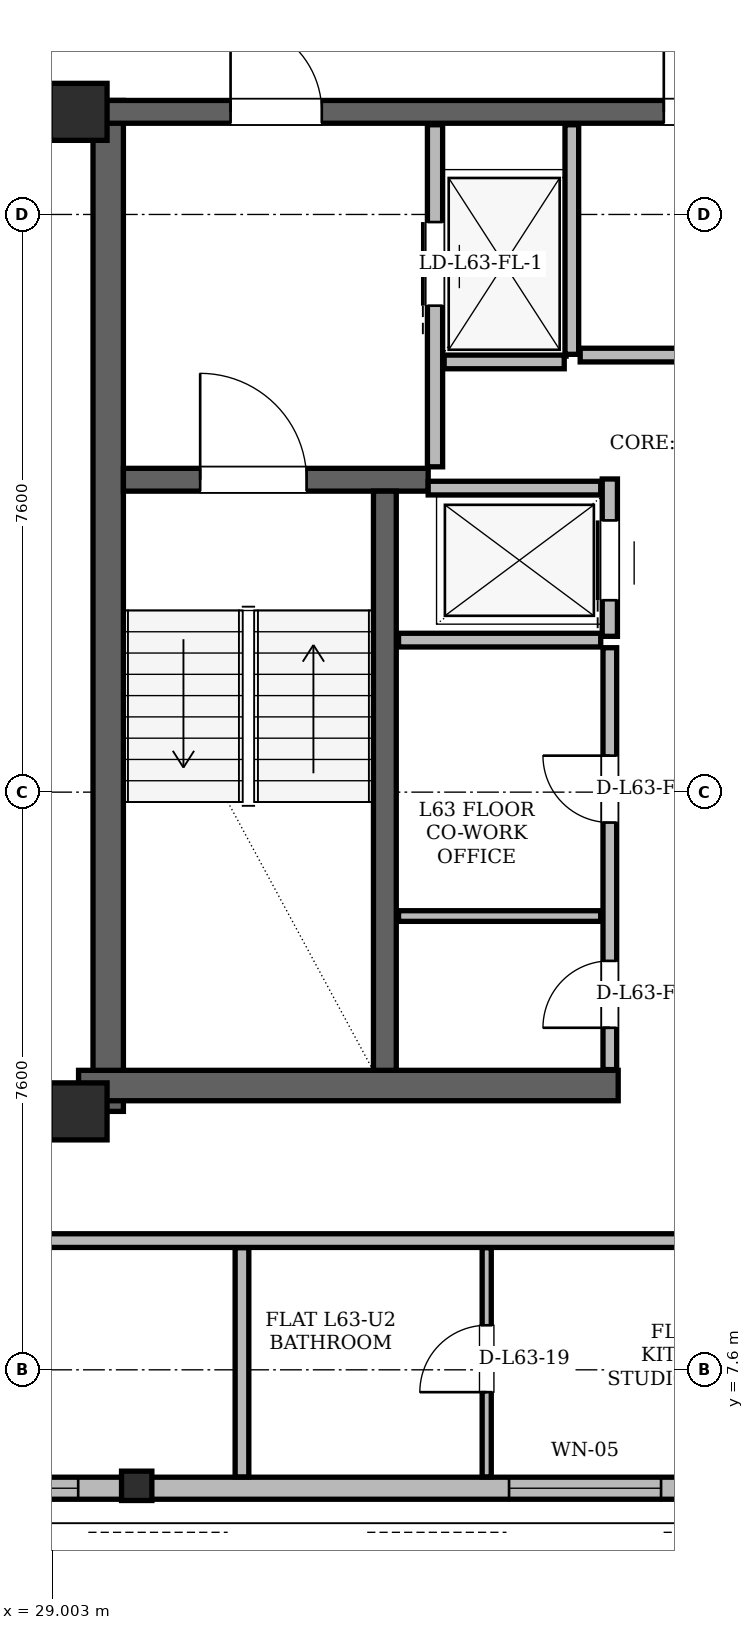
"""IFC4 building model, lengths in metres.
Left out: names, types, materials, properties, quantities, classifications, styles, units other than length and angle.
Written with IfcOpenShell. Run it as: python <this file> out.ifc"""

import sys

from ifc_helpers import new_model, si_unit, direction, frame, frame_2d, origin, origin_2d, place, context, subcontext, project, spatial, rectangle, hollow_rectangle, i_section, extrude, element, fill, save


model = new_model("IFC4")
c1 = context("Model", 3, precision=1e-05, world=origin(), true_north=direction((0.0, 1.0)))
c2 = subcontext(c1, "Body", "Model", "MODEL_VIEW")
j1 = project(units=[si_unit("LENGTHUNIT", "METRE"), si_unit("PLANEANGLEUNIT", "RADIAN")], contexts=[c1])
p1 = place(None, origin())
s1 = spatial("IfcSite", under=j1, at=p1, CompositionType="ELEMENT")
p2 = place(p1, origin())
s2 = spatial("IfcBuilding", under=s1, at=p2, CompositionType="ELEMENT")
p3 = place(p2, frame((0.0, 0.0, 237.9)))
s3 = spatial("IfcBuildingStorey", under=s2, at=p3, CompositionType="ELEMENT", Elevation=237.9)
for number, where, z_axis, x_axis in (
    (1, (29.35, 11.0, 0.0), (0.0, 0.0, 1.0), (1.0, 0.0, 0.0)),
    (2, (29.35, 24.15, 0.0), (0.0, 0.0, 1.0), (1.0, 0.0, 0.0)),
):
    element("IfcColumn", number, at=place(p3, frame(where, z_axis=z_axis, x_axis=x_axis)), inside=s3, PredefinedType="COLUMN", context=c2, shape_type="SweptSolid", body=[
        extrude(hollow_rectangle(XDim=0.75, YDim=0.75, WallThickness=0.06, at=origin_2d()), origin(), (0.0, 0.0, 1.0), 3.6),
    ])
p4 = place(p3, frame((30.12, 6.042, 0.005), z_axis=(-0.002854940465, 0.017605466202, 0.999840935787), x_axis=(-0.987105477748, -0.160071158554, 0.0)))
e3 = element("IfcColumn", 3, at=p4, inside=s3, PredefinedType="COLUMN", context=c2, shape_type="SweptSolid", body=[
    extrude(i_section(OverallWidth=0.399, OverallDepth=0.386, WebThickness=0.021, FlangeThickness=0.033, at=origin_2d()), origin(), (0.0, 0.0, 1.0), 3.592),
])
p5 = place(p3, frame((29.74, 11.0, 0.0), z_axis=(0.0, 0.0, 1.0), x_axis=(0.0, 1.0, 0.0)))
e4 = element("IfcWall", 4, at=p5, inside=s3, PredefinedType="SHEAR", context=c2, shape_type="SweptSolid", body=[
    extrude(rectangle(XDim=13.3, YDim=0.4, at=frame_2d((6.65, 0.0))), origin(), (0.0, 0.0, 1.0), 3.38),
])
p6 = place(p3, frame((29.35, 11.34, 0.0), z_axis=(0.0, 0.0, 1.0), x_axis=(1.0, 0.0, 0.0)))
e5 = element("IfcWall", 5, at=p6, inside=s3, PredefinedType="SHEAR", context=c2, shape_type="SweptSolid", body=[
    extrude(rectangle(XDim=7.1, YDim=0.4, at=frame_2d((3.55, 0.0))), origin(), (0.0, 0.0, 1.0), 3.38),
])
p7 = place(p3, frame((29.65, 24.15, 0.0), z_axis=(0.0, 0.0, 1.0), x_axis=(1.0, 0.0, 0.0)))
e6 = element("IfcWall", 6, at=p7, inside=s3, PredefinedType="SHEAR", context=c2, shape_type="SweptSolid", body=[
    extrude(rectangle(XDim=15.7, YDim=0.3, at=frame_2d((7.85, 0.0))), origin(), (0.0, 0.0, 1.0), 3.38),
])
p8 = place(p7, frame((1.7, 0.0, 0.0)))
e7 = element("IfcOpeningElement", 7, at=p8, cuts=e6, PredefinedType="OPENING", context=c2, shape_type="SweptSolid", body=[
    extrude(rectangle(XDim=1.2, YDim=2.2, at=frame_2d((0.6, 1.1))), frame((0.0, 0.15, 0.0), z_axis=(0.0, -1.0, 0.0), x_axis=(1.0, 0.0, 0.0)), (0.0, 0.0, 1.0), 0.3),
])
p9 = place(p7, frame((12.8, 0.0, 0.0)))
e8 = element("IfcOpeningElement", 8, at=p9, cuts=e6, PredefinedType="OPENING", context=c2, shape_type="SweptSolid", body=[
    extrude(rectangle(XDim=1.2, YDim=2.2, at=frame_2d((0.6, 1.1))), frame((0.0, 0.15, 0.0), z_axis=(0.0, -1.0, 0.0), x_axis=(1.0, 0.0, 0.0)), (0.0, 0.0, 1.0), 0.3),
])
p10 = place(p7, frame((7.4, 0.0, 0.0)))
e9 = element("IfcOpeningElement", 9, at=p10, cuts=e6, PredefinedType="OPENING", context=c2, shape_type="SweptSolid", body=[
    extrude(rectangle(XDim=0.9, YDim=2.05, at=frame_2d((0.45, 1.025))), frame((0.0, 0.15, 0.0), z_axis=(0.0, -1.0, 0.0), x_axis=(1.0, 0.0, 0.0)), (0.0, 0.0, 1.0), 0.3),
])
p11 = place(p3, frame((29.94, 19.31, 0.0), z_axis=(0.0, 0.0, 1.0), x_axis=(1.0, 0.0, 0.0)))
e10 = element("IfcWall", 10, at=p11, inside=s3, PredefinedType="SHEAR", context=c2, shape_type="SweptSolid", body=[
    extrude(rectangle(XDim=4.01, YDim=0.3, at=frame_2d((2.005, 0.0))), origin(), (0.0, 0.0, 1.0), 3.38),
])
p12 = place(p11, frame((1.01, 0.0, 0.0)))
e11 = element("IfcOpeningElement", 11, at=p12, cuts=e10, PredefinedType="OPENING", context=c2, shape_type="SweptSolid", body=[
    extrude(rectangle(XDim=1.4, YDim=2.2, at=frame_2d((0.7, 1.1))), frame((0.0, 0.15, 0.0), z_axis=(0.0, -1.0, 0.0), x_axis=(1.0, 0.0, 0.0)), (0.0, 0.0, 1.0), 0.3),
])
p13 = place(p3, frame((33.38, 11.54, 0.0), z_axis=(0.0, 0.0, 1.0), x_axis=(0.0, 1.0, 0.0)))
e12 = element("IfcWall", 12, at=p13, inside=s3, PredefinedType="SHEAR", context=c2, shape_type="SweptSolid", body=[
    extrude(rectangle(XDim=7.62, YDim=0.3, at=frame_2d((3.81, 0.0))), origin(), (0.0, 0.0, 1.0), 3.38),
])
p14 = place(p3, frame((19.05, 6.042, 0.0), z_axis=(0.0, 0.0, 1.0), x_axis=(1.0, 0.0, 0.0)))
e13 = element("IfcWall", 13, at=p14, inside=s3, PredefinedType="SOLIDWALL", context=c2, shape_type="SweptSolid", body=[
    extrude(rectangle(XDim=36.9, YDim=0.29, at=frame_2d((18.45, 0.0))), origin(), (0.0, 0.0, 1.0), 2.677),
])
p15 = place(p14, frame((3.639, 0.0, 0.0)))
e14 = element("IfcOpeningElement", 14, at=p15, cuts=e13, PredefinedType="OPENING", context=c2, shape_type="SweptSolid", body=[
    extrude(rectangle(XDim=1.5, YDim=2.2, at=frame_2d((0.75, 1.1))), frame((0.0, 0.145, 0.0), z_axis=(0.0, -1.0, 0.0), x_axis=(1.0, 0.0, 0.0)), (0.0, 0.0, 1.0), 0.29),
])
p16 = place(p14, frame((27.365, 0.0, 0.0)))
e15 = element("IfcOpeningElement", 15, at=p16, cuts=e13, PredefinedType="OPENING", context=c2, shape_type="SweptSolid", body=[
    extrude(rectangle(XDim=1.5, YDim=2.2, at=frame_2d((0.75, 1.1))), frame((0.0, 0.145, 0.0), z_axis=(0.0, -1.0, 0.0), x_axis=(1.0, 0.0, 0.0)), (0.0, 0.0, 1.0), 0.29),
])
p17 = place(p14, frame((8.495, 0.0, 0.85)))
e16 = element("IfcOpeningElement", 16, at=p17, cuts=e13, PredefinedType="OPENING", context=c2, shape_type="SweptSolid", body=[
    extrude(rectangle(XDim=1.8, YDim=1.717, at=frame_2d((0.9, 0.858))), frame((0.0, 0.145, 0.0), z_axis=(0.0, -1.0, 0.0), x_axis=(1.0, 0.0, 0.0)), (0.0, 0.0, 1.0), 0.29),
])
p18 = place(p14, frame((15.964, 0.0, 0.85)))
e17 = element("IfcOpeningElement", 17, at=p18, cuts=e13, PredefinedType="OPENING", context=c2, shape_type="SweptSolid", body=[
    extrude(rectangle(XDim=2.0, YDim=1.717, at=frame_2d((1.0, 0.858))), frame((0.0, 0.145, 0.0), z_axis=(0.0, -1.0, 0.0), x_axis=(1.0, 0.0, 0.0)), (0.0, 0.0, 1.0), 0.29),
])
p19 = place(p14, frame((21.956, 0.0, 0.85)))
e18 = element("IfcOpeningElement", 18, at=p19, cuts=e13, PredefinedType="OPENING", context=c2, shape_type="SweptSolid", body=[
    extrude(rectangle(XDim=1.4, YDim=1.6, at=frame_2d((0.7, 0.8))), frame((0.0, 0.145, 0.0), z_axis=(0.0, -1.0, 0.0), x_axis=(1.0, 0.0, 0.0)), (0.0, 0.0, 1.0), 0.29),
])
p20 = place(p14, frame((32.487, 0.0, 0.85)))
e19 = element("IfcOpeningElement", 19, at=p20, cuts=e13, PredefinedType="OPENING", context=c2, shape_type="SweptSolid", body=[
    extrude(rectangle(XDim=1.2, YDim=1.48, at=frame_2d((0.6, 0.74))), frame((0.0, 0.145, 0.0), z_axis=(0.0, -1.0, 0.0), x_axis=(1.0, 0.0, 0.0)), (0.0, 0.0, 1.0), 0.29),
])
p21 = place(p3, frame((34.551, 43.107, 0.0), z_axis=(0.0, 0.0, 1.0), x_axis=(-0.500002325133, -0.866024061364, 0.0)))
e20 = element("IfcWall", 20, at=p21, inside=s3, PredefinedType="SOLIDWALL", context=c2, shape_type="SweptSolid", body=[
    extrude(rectangle(XDim=36.9, YDim=0.29, at=frame_2d((18.45, 0.0))), origin(), (0.0, 0.0, 1.0), 2.677),
])
p22 = place(p21, frame((3.429, 0.0, 0.0)))
e21 = element("IfcOpeningElement", 21, at=p22, cuts=e20, PredefinedType="OPENING", context=c2, shape_type="SweptSolid", body=[
    extrude(rectangle(XDim=1.5, YDim=2.2, at=frame_2d((0.75, 1.1))), frame((0.0, 0.145, 0.0), z_axis=(0.0, -1.0, 0.0), x_axis=(1.0, 0.0, 0.0)), (0.0, 0.0, 1.0), 0.29),
])
p23 = place(p21, frame((28.625, 0.0, 0.0)))
e22 = element("IfcOpeningElement", 22, at=p23, cuts=e20, PredefinedType="OPENING", context=c2, shape_type="SweptSolid", body=[
    extrude(rectangle(XDim=1.5, YDim=2.2, at=frame_2d((0.75, 1.1))), frame((0.0, 0.145, 0.0), z_axis=(0.0, -1.0, 0.0), x_axis=(1.0, 0.0, 0.0)), (0.0, 0.0, 1.0), 0.29),
])
p24 = place(p21, frame((21.887, 0.0, 0.85)))
e23 = element("IfcOpeningElement", 23, at=p24, cuts=e20, PredefinedType="OPENING", context=c2, shape_type="SweptSolid", body=[
    extrude(rectangle(XDim=2.4, YDim=1.717, at=frame_2d((1.2, 0.858))), frame((0.0, 0.145, 0.0), z_axis=(0.0, -1.0, 0.0), x_axis=(1.0, 0.0, 0.0)), (0.0, 0.0, 1.0), 0.29),
])
p25 = place(p21, frame((34.716, 0.0, 0.85)))
e24 = element("IfcOpeningElement", 24, at=p25, cuts=e20, PredefinedType="OPENING", context=c2, shape_type="SweptSolid", body=[
    extrude(rectangle(XDim=1.2, YDim=1.48, at=frame_2d((0.6, 0.74))), frame((0.0, 0.145, 0.0), z_axis=(0.0, -1.0, 0.0), x_axis=(1.0, 0.0, 0.0)), (0.0, 0.0, 1.0), 0.29),
])
p26 = place(p21, frame((32.59, 0.0, 0.85)))
e25 = element("IfcOpeningElement", 25, at=p26, cuts=e20, PredefinedType="OPENING", context=c2, shape_type="SweptSolid", body=[
    extrude(rectangle(XDim=1.2, YDim=1.48, at=frame_2d((0.6, 0.74))), frame((0.0, 0.145, 0.0), z_axis=(0.0, -1.0, 0.0), x_axis=(1.0, 0.0, 0.0)), (0.0, 0.0, 1.0), 0.29),
])
p27 = place(p21, frame((12.187, 0.0, 0.85)))
e26 = element("IfcOpeningElement", 26, at=p27, cuts=e20, PredefinedType="OPENING", context=c2, shape_type="SweptSolid", body=[
    extrude(rectangle(XDim=1.2, YDim=1.48, at=frame_2d((0.6, 0.74))), frame((0.0, 0.145, 0.0), z_axis=(0.0, -1.0, 0.0), x_axis=(1.0, 0.0, 0.0)), (0.0, 0.0, 1.0), 0.29),
])
p28 = place(p21, frame((16.565, 0.0, 0.85)))
e27 = element("IfcOpeningElement", 27, at=p28, cuts=e20, PredefinedType="OPENING", context=c2, shape_type="SweptSolid", body=[
    extrude(rectangle(XDim=2.0, YDim=1.717, at=frame_2d((1.0, 0.858))), frame((0.0, 0.145, 0.0), z_axis=(0.0, -1.0, 0.0), x_axis=(1.0, 0.0, 0.0)), (0.0, 0.0, 1.0), 0.29),
])
p29 = place(p21, frame((6.94, 0.0, 0.85)))
e28 = element("IfcOpeningElement", 28, at=p29, cuts=e20, PredefinedType="OPENING", context=c2, shape_type="SweptSolid", body=[
    extrude(rectangle(XDim=1.2, YDim=1.48, at=frame_2d((0.6, 0.74))), frame((0.0, 0.145, 0.0), z_axis=(0.0, -1.0, 0.0), x_axis=(1.0, 0.0, 0.0)), (0.0, 0.0, 1.0), 0.29),
])
p30 = place(p3, frame((34.04, 19.48, 0.0), z_axis=(0.0, 0.0, 1.0), x_axis=(0.0, 1.0, 0.0)))
e29 = element("IfcWall", 29, at=p30, inside=s3, PredefinedType="PARTITIONING", context=c2, shape_type="SweptSolid", body=[
    extrude(rectangle(XDim=4.5, YDim=0.2, at=frame_2d((2.25, 0.0))), origin(), (0.0, 0.0, 1.0), 3.38),
])
p31 = place(p30, frame((2.12, 0.0, 0.0)))
e30 = element("IfcOpeningElement", 30, at=p31, cuts=e29, PredefinedType="OPENING", context=c2, shape_type="SweptSolid", body=[
    extrude(rectangle(XDim=1.1, YDim=2.2, at=frame_2d((0.55, 1.1))), frame((0.0, 0.1, 0.0), z_axis=(0.0, -1.0, 0.0), x_axis=(1.0, 0.0, 0.0)), (0.0, 0.0, 1.0), 0.2),
])
p32 = place(p3, frame((35.84, 20.96, 0.0), z_axis=(0.0, 0.0, 1.0), x_axis=(0.0, 1.0, 0.0)))
e31 = element("IfcWall", 31, at=p32, inside=s3, PredefinedType="PARTITIONING", context=c2, shape_type="SweptSolid", body=[
    extrude(rectangle(XDim=3.02, YDim=0.18, at=frame_2d((1.51, 0.0))), origin(), (0.0, 0.0, 1.0), 3.38),
])
p33 = place(p3, frame((34.16, 20.86, 0.0), z_axis=(0.0, 0.0, 1.0), x_axis=(1.0, 0.0, 0.0)))
e32 = element("IfcWall", 32, at=p33, inside=s3, PredefinedType="PARTITIONING", context=c2, shape_type="SweptSolid", body=[
    extrude(rectangle(XDim=1.58, YDim=0.18, at=frame_2d((0.79, 0.0))), origin(), (0.0, 0.0, 1.0), 3.38),
])
p34 = place(p3, frame((36.34, 17.25, 0.0), z_axis=(0.0, 0.0, 1.0), x_axis=(0.0, 1.0, 0.0)))
e33 = element("IfcWall", 33, at=p34, inside=s3, PredefinedType="PARTITIONING", context=c2, shape_type="SweptSolid", body=[
    extrude(rectangle(XDim=2.07, YDim=0.2, at=frame_2d((1.035, 0.0))), origin(), (0.0, 0.0, 1.0), 3.38),
])
p35 = place(p34, frame((0.475, 0.0, 0.0)))
e34 = element("IfcOpeningElement", 34, at=p35, cuts=e33, PredefinedType="OPENING", context=c2, shape_type="SweptSolid", body=[
    extrude(rectangle(XDim=1.05, YDim=2.15, at=frame_2d((0.525, 1.075))), frame((0.0, 0.1, 0.0), z_axis=(0.0, -1.0, 0.0), x_axis=(1.0, 0.0, 0.0)), (0.0, 0.0, 1.0), 0.2),
])
p36 = place(p3, frame((33.95, 19.2, 0.0), z_axis=(0.0, 0.0, 1.0), x_axis=(1.0, 0.0, 0.0)))
e35 = element("IfcWall", 35, at=p36, inside=s3, PredefinedType="PARTITIONING", context=c2, shape_type="SweptSolid", body=[
    extrude(rectangle(XDim=2.27, YDim=0.18, at=frame_2d((1.135, 0.0))), origin(), (0.0, 0.0, 1.0), 3.38),
])
p37 = place(p3, frame((33.56, 17.2, 0.0), z_axis=(0.0, 0.0, 1.0), x_axis=(1.0, 0.0, 0.0)))
e36 = element("IfcWall", 36, at=p37, inside=s3, PredefinedType="PARTITIONING", context=c2, shape_type="SweptSolid", body=[
    extrude(rectangle(XDim=2.66, YDim=0.18, at=frame_2d((1.33, 0.0))), origin(), (0.0, 0.0, 1.0), 3.38),
])
p38 = place(p3, frame((36.34, 11.55, 0.0), z_axis=(0.0, 0.0, 1.0), x_axis=(0.0, 1.0, 0.0)))
e37 = element("IfcWall", 37, at=p38, inside=s3, PredefinedType="PARTITIONING", context=c2, shape_type="SweptSolid", body=[
    extrude(rectangle(XDim=5.55, YDim=0.18, at=frame_2d((2.775, 0.0))), origin(), (0.0, 0.0, 1.0), 3.38),
])
p39 = place(p38, frame((0.55, 0.0, 0.0)))
e38 = element("IfcOpeningElement", 38, at=p39, cuts=e37, PredefinedType="OPENING", context=c2, shape_type="SweptSolid", body=[
    extrude(rectangle(XDim=0.88, YDim=2.08, at=frame_2d((0.44, 1.04))), frame((0.0, 0.09, 0.0), z_axis=(0.0, -1.0, 0.0), x_axis=(1.0, 0.0, 0.0)), (0.0, 0.0, 1.0), 0.18),
])
p40 = place(p38, frame((3.25, 0.0, 0.0)))
e39 = element("IfcOpeningElement", 39, at=p40, cuts=e37, PredefinedType="OPENING", context=c2, shape_type="SweptSolid", body=[
    extrude(rectangle(XDim=0.88, YDim=2.08, at=frame_2d((0.44, 1.04))), frame((0.0, 0.09, 0.0), z_axis=(0.0, -1.0, 0.0), x_axis=(1.0, 0.0, 0.0)), (0.0, 0.0, 1.0), 0.18),
])
p41 = place(p3, frame((33.56, 13.57, 0.0), z_axis=(0.0, 0.0, 1.0), x_axis=(1.0, 0.0, 0.0)))
e40 = element("IfcWall", 40, at=p41, inside=s3, PredefinedType="PARTITIONING", context=c2, shape_type="SweptSolid", body=[
    extrude(rectangle(XDim=2.66, YDim=0.14, at=frame_2d((1.33, 0.0))), origin(), (0.0, 0.0, 1.0), 3.38),
])
p42 = place(p3, frame((35.95, 20.95, 0.0), z_axis=(0.0, 0.0, 1.0), x_axis=(1.0, 0.0, 0.0)))
e41 = element("IfcWall", 41, at=p42, inside=s3, PredefinedType="PARTITIONING", context=c2, shape_type="SweptSolid", body=[
    extrude(rectangle(XDim=3.1, YDim=0.18, at=frame_2d((1.55, 0.0))), origin(), (0.0, 0.0, 1.0), 3.38),
])
p43 = place(p3, frame((25.6, 9.3, 0.0), z_axis=(0.0, 0.0, 1.0), x_axis=(1.0, 0.0, 0.0)))
e42 = element("IfcWall", 42, at=p43, inside=s3, PredefinedType="PARTITIONING", context=c2, shape_type="SweptSolid", body=[
    extrude(rectangle(XDim=21.85, YDim=0.18, at=frame_2d((10.925, 0.0))), origin(), (0.0, 0.0, 1.0), 2.913),
])
p44 = place(p43, frame((2.325, 0.0, 0.0)))
e43 = element("IfcOpeningElement", 43, at=p44, cuts=e42, PredefinedType="OPENING", context=c2, shape_type="SweptSolid", body=[
    extrude(rectangle(XDim=1.0, YDim=2.18, at=frame_2d((0.5, 1.09))), frame((0.0, 0.09, 0.0), z_axis=(0.0, -1.0, 0.0), x_axis=(1.0, 0.0, 0.0)), (0.0, 0.0, 1.0), 0.18),
])
p45 = place(p43, frame((13.793, 0.0, 0.0)))
e44 = element("IfcOpeningElement", 44, at=p45, cuts=e42, PredefinedType="OPENING", context=c2, shape_type="SweptSolid", body=[
    extrude(rectangle(XDim=1.0, YDim=2.18, at=frame_2d((0.5, 1.09))), frame((0.0, 0.09, 0.0), z_axis=(0.0, -1.0, 0.0), x_axis=(1.0, 0.0, 0.0)), (0.0, 0.0, 1.0), 0.18),
])
p46 = place(p43, frame((18.812, 0.0, 0.0)))
e45 = element("IfcOpeningElement", 45, at=p46, cuts=e42, PredefinedType="OPENING", context=c2, shape_type="SweptSolid", body=[
    extrude(rectangle(XDim=1.0, YDim=2.18, at=frame_2d((0.5, 1.09))), frame((0.0, 0.09, 0.0), z_axis=(0.0, -1.0, 0.0), x_axis=(1.0, 0.0, 0.0)), (0.0, 0.0, 1.0), 0.18),
])
p47 = place(p3, frame((31.5, 6.191, 0.0), z_axis=(0.0, 0.0, 1.0), x_axis=(0.0, 1.0, 0.0)))
e46 = element("IfcWall", 46, at=p47, inside=s3, PredefinedType="PARTITIONING", context=c2, shape_type="SweptSolid", body=[
    extrude(rectangle(XDim=3.015, YDim=0.18, at=frame_2d((1.507, 0.0))), origin(), (0.0, 0.0, 1.0), 2.966),
])
p48 = place(p3, frame((34.72, 6.191, 0.0), z_axis=(0.0, 0.0, 1.0), x_axis=(0.0, 1.0, 0.0)))
e47 = element("IfcWall", 47, at=p48, inside=s3, PredefinedType="PARTITIONING", context=c2, shape_type="SweptSolid", body=[
    extrude(rectangle(XDim=3.015, YDim=0.12, at=frame_2d((1.507, 0.0))), origin(), (0.0, 0.0, 1.0), 3.38),
])
p49 = place(p48, frame((1.115, 0.0, 0.0)))
e48 = element("IfcOpeningElement", 48, at=p49, cuts=e47, PredefinedType="OPENING", context=c2, shape_type="SweptSolid", body=[
    extrude(rectangle(XDim=0.88, YDim=2.08, at=frame_2d((0.44, 1.04))), frame((0.0, 0.06, 0.0), z_axis=(0.0, -1.0, 0.0), x_axis=(1.0, 0.0, 0.0)), (0.0, 0.0, 1.0), 0.12),
])
p50 = place(p17, origin())
e49 = element("IfcWindow", 49, at=p50, inside=s3, PartitioningType="SINGLE_PANEL", PredefinedType="WINDOW", context=c2, shape_type="SweptSolid", body=[
    extrude(rectangle(XDim=1.8, YDim=1.717, at=frame_2d((0.9, 0.858))), frame((0.0, 0.03, 0.0), z_axis=(0.0, -1.0, 0.0), x_axis=(1.0, 0.0, 0.0)), (0.0, 0.0, 1.0), 0.06),
])
fill(e16, e49)
p51 = place(p18, origin())
e50 = element("IfcWindow", 50, at=p51, inside=s3, PartitioningType="SINGLE_PANEL", PredefinedType="WINDOW", context=c2, shape_type="SweptSolid", body=[
    extrude(rectangle(XDim=2.0, YDim=1.717, at=frame_2d((1.0, 0.858))), frame((0.0, 0.03, 0.0), z_axis=(0.0, -1.0, 0.0), x_axis=(1.0, 0.0, 0.0)), (0.0, 0.0, 1.0), 0.06),
])
fill(e17, e50)
p52 = place(p39, origin())
e51 = element("IfcDoor", 51, at=p52, inside=s3, OperationType="SINGLE_SWING_LEFT", PredefinedType="DOOR", context=c2, shape_type="SweptSolid", body=[
    extrude(rectangle(XDim=0.88, YDim=2.08, at=frame_2d((0.44, 1.04))), frame((0.0, 0.025, 0.0), z_axis=(0.0, -1.0, 0.0), x_axis=(1.0, 0.0, 0.0)), (0.0, 0.0, 1.0), 0.05),
])
fill(e38, e51)
p53 = place(p40, origin())
e52 = element("IfcDoor", 52, at=p53, inside=s3, OperationType="SINGLE_SWING_RIGHT", PredefinedType="DOOR", context=c2, shape_type="SweptSolid", body=[
    extrude(rectangle(XDim=0.88, YDim=2.08, at=frame_2d((0.44, 1.04))), frame((0.0, 0.025, 0.0), z_axis=(0.0, -1.0, 0.0), x_axis=(1.0, 0.0, 0.0)), (0.0, 0.0, 1.0), 0.05),
])
fill(e39, e52)
p54 = place(p31, origin())
e53 = element("IfcDoor", 53, at=p54, inside=s3, OperationType="SLIDING_TO_LEFT", PredefinedType="DOOR", context=c2, shape_type="SweptSolid", body=[
    extrude(rectangle(XDim=1.1, YDim=2.2, at=frame_2d((0.55, 1.1))), frame((0.0, 0.025, 0.0), z_axis=(0.0, -1.0, 0.0), x_axis=(1.0, 0.0, 0.0)), (0.0, 0.0, 1.0), 0.05),
])
fill(e30, e53)
p55 = place(p35, origin())
e54 = element("IfcDoor", 54, at=p55, inside=s3, OperationType="SLIDING_TO_LEFT", PredefinedType="DOOR", context=c2, shape_type="SweptSolid", body=[
    extrude(rectangle(XDim=1.05, YDim=2.15, at=frame_2d((0.525, 1.075))), frame((0.0, 0.025, 0.0), z_axis=(0.0, -1.0, 0.0), x_axis=(1.0, 0.0, 0.0)), (0.0, 0.0, 1.0), 0.05),
])
fill(e34, e54)
p56 = place(p12, origin())
e55 = element("IfcDoor", 55, at=p56, inside=s3, OperationType="SINGLE_SWING_LEFT", PredefinedType="DOOR", context=c2, shape_type="SweptSolid", body=[
    extrude(rectangle(XDim=1.4, YDim=2.2, at=frame_2d((0.7, 1.1))), frame((0.0, 0.025, 0.0), z_axis=(0.0, -1.0, 0.0), x_axis=(1.0, 0.0, 0.0)), (0.0, 0.0, 1.0), 0.05),
])
fill(e11, e55)
p57 = place(p8, origin())
e56 = element("IfcDoor", 56, at=p57, inside=s3, OperationType="SINGLE_SWING_LEFT", PredefinedType="DOOR", context=c2, shape_type="SweptSolid", body=[
    extrude(rectangle(XDim=1.2, YDim=2.2, at=frame_2d((0.6, 1.1))), frame((0.0, 0.025, 0.0), z_axis=(0.0, -1.0, 0.0), x_axis=(1.0, 0.0, 0.0)), (0.0, 0.0, 1.0), 0.05),
])
fill(e7, e56)
p58 = place(p10, origin())
e57 = element("IfcDoor", 57, at=p58, inside=s3, OperationType="SINGLE_SWING_LEFT", PredefinedType="DOOR", context=c2, shape_type="SweptSolid", body=[
    extrude(rectangle(XDim=0.9, YDim=2.05, at=frame_2d((0.45, 1.025))), frame((0.0, 0.025, 0.0), z_axis=(0.0, -1.0, 0.0), x_axis=(1.0, 0.0, 0.0)), (0.0, 0.0, 1.0), 0.05),
])
fill(e9, e57)
p59 = place(p49, origin())
e58 = element("IfcDoor", 58, at=p59, inside=s3, OperationType="SINGLE_SWING_LEFT", PredefinedType="DOOR", context=c2, shape_type="SweptSolid", body=[
    extrude(rectangle(XDim=0.88, YDim=2.08, at=frame_2d((0.44, 1.04))), frame((0.0, 0.025, 0.0), z_axis=(0.0, -1.0, 0.0), x_axis=(1.0, 0.0, 0.0)), (0.0, 0.0, 1.0), 0.05),
])
fill(e48, e58)
save(model, sys.argv[1])
